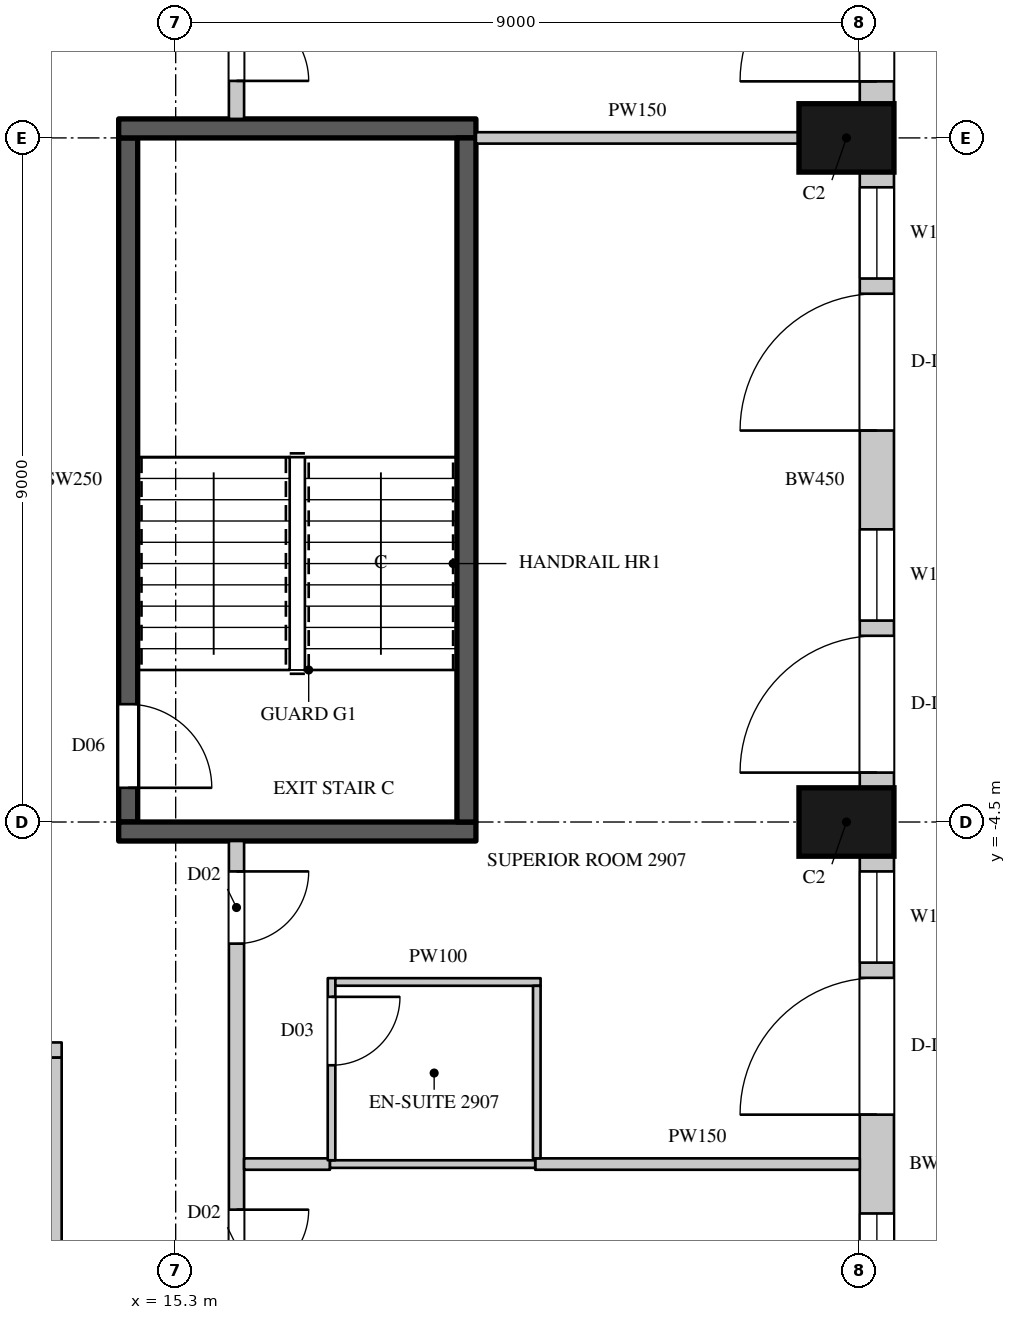
"""IFC4 building model, lengths in metres.
Left out: names, types, materials, properties, quantities, classifications, styles, units other than length and angle.
Written with IfcOpenShell. Run it as: python <this file> out.ifc"""

import sys

from ifc_helpers import new_model, si_unit, direction, frame, frame_2d, origin, origin_2d, place, context, subcontext, project, spatial, rectangle, extrude, element, fill, save


model = new_model("IFC4")
c1 = context("Model", 3, precision=1e-05, world=origin(), true_north=direction((0.0, 1.0)))
c2 = subcontext(c1, "Body", "Model", "MODEL_VIEW")
j1 = project(units=[si_unit("LENGTHUNIT", "METRE"), si_unit("PLANEANGLEUNIT", "RADIAN")], contexts=[c1])
p1 = place(None, origin())
s1 = spatial("IfcSite", under=j1, at=p1, CompositionType="ELEMENT")
p2 = place(p1, origin())
s2 = spatial("IfcBuilding", under=s1, at=p2, CompositionType="ELEMENT")
p3 = place(p2, frame((0.0, 0.0, 134.7)))
s3 = spatial("IfcBuildingStorey", under=s2, at=p3, CompositionType="ELEMENT", Elevation=134.7)
for number, where, z_axis, x_axis in (
    (1, (24.125, -4.5, 0.0), (0.0, 0.0, 1.0), (0.0, 1.0, 0.0)),
    (2, (24.125, 4.5, 0.0), (0.0, 0.0, 1.0), (0.0, 1.0, 0.0)),
):
    element("IfcColumn", number, at=place(p3, frame(where, z_axis=z_axis, x_axis=x_axis)), inside=s3, PredefinedType="COLUMN", context=c2, shape_type="SweptSolid", body=[
        extrude(rectangle(XDim=0.9, YDim=1.25, at=origin_2d()), origin(), (0.0, 0.0, 1.0), 3.6),
    ])
p4 = place(p3, frame((24.525, -13.05, 0.0), z_axis=(0.0, 0.0, 1.0), x_axis=(0.0, 1.0, 0.0)))
e3 = element("IfcWall", 3, at=p4, inside=s3, PredefinedType="SOLIDWALL", context=c2, shape_type="SweptSolid", body=[
    extrude(rectangle(XDim=8.1, YDim=0.45, at=frame_2d((4.05, 0.0))), origin(), (0.0, 0.0, 1.0), 3.3),
])
p5 = place(p4, frame((0.2, 0.0, 0.0)))
e4 = element("IfcOpeningElement", 4, at=p5, cuts=e3, PredefinedType="OPENING", context=c2, shape_type="SweptSolid", body=[
    extrude(rectangle(XDim=1.8, YDim=2.4, at=frame_2d((0.9, 1.2))), frame((0.0, 0.235, 0.0), z_axis=(0.0, -1.0, 0.0), x_axis=(1.0, 0.0, 0.0)), (0.0, 0.0, 1.0), 0.47),
])
p6 = place(p4, frame((2.2, 0.0, 1.05)))
e5 = element("IfcOpeningElement", 5, at=p6, cuts=e3, PredefinedType="OPENING", context=c2, shape_type="SweptSolid", body=[
    extrude(rectangle(XDim=1.2, YDim=2.0, at=frame_2d((0.6, 1.0))), frame((0.0, 0.235, 0.0), z_axis=(0.0, -1.0, 0.0), x_axis=(1.0, 0.0, 0.0)), (0.0, 0.0, 1.0), 0.47),
])
p7 = place(p4, frame((4.7, 0.0, 0.0)))
e6 = element("IfcOpeningElement", 6, at=p7, cuts=e3, PredefinedType="OPENING", context=c2, shape_type="SweptSolid", body=[
    extrude(rectangle(XDim=1.8, YDim=2.4, at=frame_2d((0.9, 1.2))), frame((0.0, 0.235, 0.0), z_axis=(0.0, -1.0, 0.0), x_axis=(1.0, 0.0, 0.0)), (0.0, 0.0, 1.0), 0.47),
])
p8 = place(p4, frame((6.7, 0.0, 1.05)))
e7 = element("IfcOpeningElement", 7, at=p8, cuts=e3, PredefinedType="OPENING", context=c2, shape_type="SweptSolid", body=[
    extrude(rectangle(XDim=1.2, YDim=2.0, at=frame_2d((0.6, 1.0))), frame((0.0, 0.235, 0.0), z_axis=(0.0, -1.0, 0.0), x_axis=(1.0, 0.0, 0.0)), (0.0, 0.0, 1.0), 0.47),
])
p9 = place(p3, frame((24.525, -4.05, 0.0), z_axis=(0.0, 0.0, 1.0), x_axis=(0.0, 1.0, 0.0)))
e8 = element("IfcWall", 8, at=p9, inside=s3, PredefinedType="SOLIDWALL", context=c2, shape_type="SweptSolid", body=[
    extrude(rectangle(XDim=8.1, YDim=0.45, at=frame_2d((4.05, 0.0))), origin(), (0.0, 0.0, 1.0), 3.3),
])
p10 = place(p9, frame((0.2, 0.0, 0.0)))
e9 = element("IfcOpeningElement", 9, at=p10, cuts=e8, PredefinedType="OPENING", context=c2, shape_type="SweptSolid", body=[
    extrude(rectangle(XDim=1.8, YDim=2.4, at=frame_2d((0.9, 1.2))), frame((0.0, 0.235, 0.0), z_axis=(0.0, -1.0, 0.0), x_axis=(1.0, 0.0, 0.0)), (0.0, 0.0, 1.0), 0.47),
])
p11 = place(p9, frame((2.2, 0.0, 1.05)))
e10 = element("IfcOpeningElement", 10, at=p11, cuts=e8, PredefinedType="OPENING", context=c2, shape_type="SweptSolid", body=[
    extrude(rectangle(XDim=1.2, YDim=2.0, at=frame_2d((0.6, 1.0))), frame((0.0, 0.235, 0.0), z_axis=(0.0, -1.0, 0.0), x_axis=(1.0, 0.0, 0.0)), (0.0, 0.0, 1.0), 0.47),
])
p12 = place(p9, frame((4.7, 0.0, 0.0)))
e11 = element("IfcOpeningElement", 11, at=p12, cuts=e8, PredefinedType="OPENING", context=c2, shape_type="SweptSolid", body=[
    extrude(rectangle(XDim=1.8, YDim=2.4, at=frame_2d((0.9, 1.2))), frame((0.0, 0.235, 0.0), z_axis=(0.0, -1.0, 0.0), x_axis=(1.0, 0.0, 0.0)), (0.0, 0.0, 1.0), 0.47),
])
p13 = place(p9, frame((6.7, 0.0, 1.05)))
e12 = element("IfcOpeningElement", 12, at=p13, cuts=e8, PredefinedType="OPENING", context=c2, shape_type="SweptSolid", body=[
    extrude(rectangle(XDim=1.2, YDim=2.0, at=frame_2d((0.6, 1.0))), frame((0.0, 0.235, 0.0), z_axis=(0.0, -1.0, 0.0), x_axis=(1.0, 0.0, 0.0)), (0.0, 0.0, 1.0), 0.47),
])
p14 = place(p3, frame((24.525, 4.95, 0.0), z_axis=(0.0, 0.0, 1.0), x_axis=(0.0, 1.0, 0.0)))
e13 = element("IfcWall", 13, at=p14, inside=s3, PredefinedType="SOLIDWALL", context=c2, shape_type="SweptSolid", body=[
    extrude(rectangle(XDim=8.439, YDim=0.45, at=frame_2d((4.219, 0.0))), origin(), (0.0, 0.0, 1.0), 3.3),
])
p15 = place(p14, frame((0.294, 0.0, 0.0)))
e14 = element("IfcOpeningElement", 14, at=p15, cuts=e13, PredefinedType="OPENING", context=c2, shape_type="SweptSolid", body=[
    extrude(rectangle(XDim=1.8, YDim=2.4, at=frame_2d((0.9, 1.2))), frame((0.0, 0.235, 0.0), z_axis=(0.0, -1.0, 0.0), x_axis=(1.0, 0.0, 0.0)), (0.0, 0.0, 1.0), 0.47),
])
p16 = place(p14, frame((2.294, 0.0, 1.05)))
e15 = element("IfcOpeningElement", 15, at=p16, cuts=e13, PredefinedType="OPENING", context=c2, shape_type="SweptSolid", body=[
    extrude(rectangle(XDim=1.2, YDim=2.0, at=frame_2d((0.6, 1.0))), frame((0.0, 0.235, 0.0), z_axis=(0.0, -1.0, 0.0), x_axis=(1.0, 0.0, 0.0)), (0.0, 0.0, 1.0), 0.47),
])
p17 = place(p14, frame((5.232, 0.0, 1.05)))
e16 = element("IfcOpeningElement", 16, at=p17, cuts=e13, PredefinedType="OPENING", context=c2, shape_type="SweptSolid", body=[
    extrude(rectangle(XDim=2.7, YDim=2.0, at=frame_2d((1.35, 1.0))), frame((0.0, 0.235, 0.0), z_axis=(0.0, -1.0, 0.0), x_axis=(1.0, 0.0, 0.0)), (0.0, 0.0, 1.0), 0.47),
])
p18 = place(p3, frame((10.5, -7.5, 0.0), z_axis=(0.0, 0.0, 1.0), x_axis=(1.0, 0.0, 0.0)))
e17 = element("IfcWall", 17, at=p18, inside=s3, PredefinedType="PARTITIONING", context=c2, shape_type="SweptSolid", body=[
    extrude(rectangle(XDim=3.3, YDim=0.2, at=frame_2d((1.65, 0.0))), origin(), (0.0, 0.0, 1.0), 3.3),
])
p19 = place(p18, frame((2.05, 0.0, 0.0)))
e18 = element("IfcOpeningElement", 18, at=p19, cuts=e17, PredefinedType="OPENING", context=c2, shape_type="SweptSolid", body=[
    extrude(rectangle(XDim=0.9, YDim=2.2, at=frame_2d((0.45, 1.1))), frame((0.0, 0.11, 0.0), z_axis=(0.0, -1.0, 0.0), x_axis=(1.0, 0.0, 0.0)), (0.0, 0.0, 1.0), 0.22),
])
p20 = place(p3, frame((13.7, -15.0, 0.0), z_axis=(0.0, 0.0, 1.0), x_axis=(0.0, 1.0, 0.0)))
e19 = element("IfcWall", 19, at=p20, inside=s3, PredefinedType="PARTITIONING", context=c2, shape_type="SweptSolid", body=[
    extrude(rectangle(XDim=7.4, YDim=0.2, at=frame_2d((3.7, 0.0))), origin(), (0.0, 0.0, 1.0), 3.3),
])
p21 = place(p3, frame((16.1, -17.5, 0.0), z_axis=(0.0, 0.0, 1.0), x_axis=(0.0, 1.0, 0.0)))
e20 = element("IfcWall", 20, at=p21, inside=s3, PredefinedType="PARTITIONING", context=c2, shape_type="SweptSolid", body=[
    extrude(rectangle(XDim=12.75, YDim=0.2, at=frame_2d((6.375, 0.0))), origin(), (0.0, 0.0, 1.0), 3.3),
])
p22 = place(p21, frame((2.75, 0.0, 0.0)))
e21 = element("IfcOpeningElement", 21, at=p22, cuts=e20, PredefinedType="OPENING", context=c2, shape_type="SweptSolid", body=[
    extrude(rectangle(XDim=0.95, YDim=2.2, at=frame_2d((0.475, 1.1))), frame((0.0, 0.11, 0.0), z_axis=(0.0, -1.0, 0.0), x_axis=(1.0, 0.0, 0.0)), (0.0, 0.0, 1.0), 0.22),
])
p23 = place(p21, frame((6.95, 0.0, 0.0)))
e22 = element("IfcOpeningElement", 22, at=p23, cuts=e20, PredefinedType="OPENING", context=c2, shape_type="SweptSolid", body=[
    extrude(rectangle(XDim=0.95, YDim=2.2, at=frame_2d((0.475, 1.1))), frame((0.0, 0.11, 0.0), z_axis=(0.0, -1.0, 0.0), x_axis=(1.0, 0.0, 0.0)), (0.0, 0.0, 1.0), 0.22),
])
p24 = place(p21, frame((11.4, 0.0, 0.0)))
e23 = element("IfcOpeningElement", 23, at=p24, cuts=e20, PredefinedType="OPENING", context=c2, shape_type="SweptSolid", body=[
    extrude(rectangle(XDim=0.95, YDim=2.2, at=frame_2d((0.475, 1.1))), frame((0.0, 0.11, 0.0), z_axis=(0.0, -1.0, 0.0), x_axis=(1.0, 0.0, 0.0)), (0.0, 0.0, 1.0), 0.22),
])
p25 = place(p3, frame((16.1, 4.75, 0.0), z_axis=(0.0, 0.0, 1.0), x_axis=(0.0, 1.0, 0.0)))
e24 = element("IfcWall", 24, at=p25, inside=s3, PredefinedType="PARTITIONING", context=c2, shape_type="SweptSolid", body=[
    extrude(rectangle(XDim=12.65, YDim=0.2, at=frame_2d((6.325, 0.0))), origin(), (0.0, 0.0, 1.0), 3.3),
])
p26 = place(p25, frame((0.5, 0.0, 0.0)))
e25 = element("IfcOpeningElement", 25, at=p26, cuts=e24, PredefinedType="OPENING", context=c2, shape_type="SweptSolid", body=[
    extrude(rectangle(XDim=0.95, YDim=2.2, at=frame_2d((0.475, 1.1))), frame((0.0, 0.11, 0.0), z_axis=(0.0, -1.0, 0.0), x_axis=(1.0, 0.0, 0.0)), (0.0, 0.0, 1.0), 0.22),
])
p27 = place(p25, frame((6.9, 0.0, 0.0)))
e26 = element("IfcOpeningElement", 26, at=p27, cuts=e24, PredefinedType="OPENING", context=c2, shape_type="SweptSolid", body=[
    extrude(rectangle(XDim=0.95, YDim=2.2, at=frame_2d((0.475, 1.1))), frame((0.0, 0.11, 0.0), z_axis=(0.0, -1.0, 0.0), x_axis=(1.0, 0.0, 0.0)), (0.0, 0.0, 1.0), 0.22),
])
p28 = place(p3, frame((16.2, -9.0, 0.0), z_axis=(0.0, 0.0, 1.0), x_axis=(1.0, 0.0, 0.0)))
e27 = element("IfcWall", 27, at=p28, inside=s3, PredefinedType="PARTITIONING", context=c2, shape_type="SweptSolid", body=[
    extrude(rectangle(XDim=1.13, YDim=0.15, at=frame_2d((0.565, 0.0))), origin(), (0.0, 0.0, 1.0), 2.65),
])
p29 = place(p3, frame((19.25, 4.5, 0.0), z_axis=(0.0, 0.0, 1.0), x_axis=(1.0, 0.0, 0.0)))
e28 = element("IfcWall", 28, at=p29, inside=s3, PredefinedType="PARTITIONING", context=c2, shape_type="SweptSolid", body=[
    extrude(rectangle(XDim=4.25, YDim=0.15, at=frame_2d((2.125, 0.0))), origin(), (0.0, 0.0, 1.0), 3.3),
])
p30 = place(p3, frame((20.03, -9.0, 0.0), z_axis=(0.0, 0.0, 1.0), x_axis=(1.0, 0.0, 0.0)))
e29 = element("IfcWall", 29, at=p30, inside=s3, PredefinedType="PARTITIONING", context=c2, shape_type="SweptSolid", body=[
    extrude(rectangle(XDim=4.27, YDim=0.15, at=frame_2d((2.135, 0.0))), origin(), (0.0, 0.0, 1.0), 2.65),
])
p31 = place(p3, frame((14.675, -4.5, 0.0), z_axis=(0.0, 0.0, 1.0), x_axis=(0.0, 1.0, 0.0)))
e30 = element("IfcWall", 30, at=p31, inside=s3, PredefinedType="SHEAR", context=c2, shape_type="SweptSolid", body=[
    extrude(rectangle(XDim=9.0, YDim=0.25, at=frame_2d((4.5, 0.0))), origin(), (0.0, 0.0, 1.0), 3.3),
])
p32 = place(p31, frame((0.45, 0.0, 0.0)))
e31 = element("IfcOpeningElement", 31, at=p32, cuts=e30, PredefinedType="OPENING", context=c2, shape_type="SweptSolid", body=[
    extrude(rectangle(XDim=1.1, YDim=2.2, at=frame_2d((0.55, 1.1))), frame((0.0, 0.135, 0.0), z_axis=(0.0, -1.0, 0.0), x_axis=(1.0, 0.0, 0.0)), (0.0, 0.0, 1.0), 0.27),
])
for number, where, z_axis, x_axis in (
    (32, (14.55, -4.625, 0.0), (0.0, 0.0, 1.0), (1.0, 0.0, 0.0)),
    (33, (14.55, 4.625, 0.0), (0.0, 0.0, 1.0), (1.0, 0.0, 0.0)),
):
    element("IfcWall", number, at=place(p3, frame(where, z_axis=z_axis, x_axis=x_axis)), inside=s3, PredefinedType="SHEAR", context=c2, shape_type="SweptSolid", body=[
        extrude(rectangle(XDim=4.7, YDim=0.25, at=frame_2d((2.35, 0.0))), origin(), (0.0, 0.0, 1.0), 3.3),
    ])
p33 = place(p3, frame((19.125, -4.5, 0.0), z_axis=(0.0, 0.0, 1.0), x_axis=(0.0, 1.0, 0.0)))
e34 = element("IfcWall", 34, at=p33, inside=s3, PredefinedType="SHEAR", context=c2, shape_type="SweptSolid", body=[
    extrude(rectangle(XDim=9.0, YDim=0.25, at=frame_2d((4.5, 0.0))), origin(), (0.0, 0.0, 1.0), 3.3),
])
p34 = place(p3, frame((17.33, -9.0, 0.0), z_axis=(0.0, 0.0, 1.0), x_axis=(1.0, 0.0, 0.0)))
e35 = element("IfcWall", 35, at=p34, inside=s3, PredefinedType="PARTITIONING", context=c2, shape_type="SweptSolid", body=[
    extrude(rectangle(XDim=2.7, YDim=0.1, at=frame_2d((1.35, 0.0))), origin(), (0.0, 0.0, 1.0), 2.65),
])
p35 = place(p3, frame((17.35, -8.95, 0.0), z_axis=(0.0, 0.0, 1.0), x_axis=(0.000407580973, 0.999999916939, 0.0)))
e36 = element("IfcWall", 36, at=p35, inside=s3, PredefinedType="PARTITIONING", context=c2, shape_type="SweptSolid", body=[
    extrude(rectangle(XDim=2.396, YDim=0.1, at=frame_2d((1.198, 0.0))), origin(), (0.0, 0.0, 1.0), 3.3),
])
p36 = place(p35, frame((1.25, 0.0, 0.0)))
e37 = element("IfcOpeningElement", 37, at=p36, cuts=e36, PredefinedType="OPENING", context=c2, shape_type="SweptSolid", body=[
    extrude(rectangle(XDim=0.9, YDim=2.2, at=frame_2d((0.45, 1.1))), frame((0.0, 0.06, 0.0), z_axis=(0.0, -1.0, 0.0), x_axis=(1.0, 0.0, 0.0)), (0.0, 0.0, 1.0), 0.12),
])
p37 = place(p3, frame((17.401, -6.604, 0.0), z_axis=(0.0, 0.0, 1.0), x_axis=(0.9999999346, -0.000361663629, 0.0)))
e38 = element("IfcWall", 38, at=p37, inside=s3, PredefinedType="PARTITIONING", context=c2, shape_type="SweptSolid", body=[
    extrude(rectangle(XDim=2.7, YDim=0.1, at=frame_2d((1.35, 0.0))), origin(), (0.0, 0.0, 1.0), 3.3),
])
p38 = place(p3, frame((20.05, -8.925, 0.0), z_axis=(0.0, 0.0, 1.0), x_axis=(0.000430200003, 0.999999907464, 0.0)))
e39 = element("IfcWall", 39, at=p38, inside=s3, PredefinedType="PARTITIONING", context=c2, shape_type="SweptSolid", body=[
    extrude(rectangle(XDim=2.27, YDim=0.1, at=frame_2d((1.135, 0.0))), origin(), (0.0, 0.0, 1.0), 3.3),
])
p39 = place(p6, origin())
e40 = element("IfcWindow", 40, at=p39, inside=s3, PartitioningType="SINGLE_PANEL", PredefinedType="WINDOW", context=c2, shape_type="SweptSolid", body=[
    extrude(rectangle(XDim=1.2, YDim=2.0, at=frame_2d((0.6, 1.0))), frame((0.0, 0.135, 0.0), z_axis=(0.0, -1.0, 0.0), x_axis=(1.0, 0.0, 0.0)), (0.0, 0.0, 1.0), 0.06),
])
fill(e5, e40)
p40 = place(p7, origin())
e41 = element("IfcDoor", 41, at=p40, inside=s3, OperationType="SLIDING_TO_LEFT", PredefinedType="DOOR", context=c2, shape_type="SweptSolid", body=[
    extrude(rectangle(XDim=1.8, YDim=2.4, at=frame_2d((0.9, 1.2))), frame((0.0, 0.13, 0.0), z_axis=(0.0, -1.0, 0.0), x_axis=(1.0, 0.0, 0.0)), (0.0, 0.0, 1.0), 0.05),
])
fill(e6, e41)
p41 = place(p8, origin())
e42 = element("IfcWindow", 42, at=p41, inside=s3, PartitioningType="SINGLE_PANEL", PredefinedType="WINDOW", context=c2, shape_type="SweptSolid", body=[
    extrude(rectangle(XDim=1.2, YDim=2.0, at=frame_2d((0.6, 1.0))), frame((0.0, 0.135, 0.0), z_axis=(0.0, -1.0, 0.0), x_axis=(1.0, 0.0, 0.0)), (0.0, 0.0, 1.0), 0.06),
])
fill(e7, e42)
p42 = place(p10, origin())
e43 = element("IfcDoor", 43, at=p42, inside=s3, OperationType="SLIDING_TO_LEFT", PredefinedType="DOOR", context=c2, shape_type="SweptSolid", body=[
    extrude(rectangle(XDim=1.8, YDim=2.4, at=frame_2d((0.9, 1.2))), frame((0.0, 0.13, 0.0), z_axis=(0.0, -1.0, 0.0), x_axis=(1.0, 0.0, 0.0)), (0.0, 0.0, 1.0), 0.05),
])
fill(e9, e43)
p43 = place(p11, origin())
e44 = element("IfcWindow", 44, at=p43, inside=s3, PartitioningType="SINGLE_PANEL", PredefinedType="WINDOW", context=c2, shape_type="SweptSolid", body=[
    extrude(rectangle(XDim=1.2, YDim=2.0, at=frame_2d((0.6, 1.0))), frame((0.0, 0.135, 0.0), z_axis=(0.0, -1.0, 0.0), x_axis=(1.0, 0.0, 0.0)), (0.0, 0.0, 1.0), 0.06),
])
fill(e10, e44)
p44 = place(p12, origin())
e45 = element("IfcDoor", 45, at=p44, inside=s3, OperationType="SLIDING_TO_LEFT", PredefinedType="DOOR", context=c2, shape_type="SweptSolid", body=[
    extrude(rectangle(XDim=1.8, YDim=2.4, at=frame_2d((0.9, 1.2))), frame((0.0, 0.13, 0.0), z_axis=(0.0, -1.0, 0.0), x_axis=(1.0, 0.0, 0.0)), (0.0, 0.0, 1.0), 0.05),
])
fill(e11, e45)
p45 = place(p13, origin())
e46 = element("IfcWindow", 46, at=p45, inside=s3, PartitioningType="SINGLE_PANEL", PredefinedType="WINDOW", context=c2, shape_type="SweptSolid", body=[
    extrude(rectangle(XDim=1.2, YDim=2.0, at=frame_2d((0.6, 1.0))), frame((0.0, 0.135, 0.0), z_axis=(0.0, -1.0, 0.0), x_axis=(1.0, 0.0, 0.0)), (0.0, 0.0, 1.0), 0.06),
])
fill(e12, e46)
p46 = place(p15, origin())
e47 = element("IfcDoor", 47, at=p46, inside=s3, OperationType="SLIDING_TO_LEFT", PredefinedType="DOOR", context=c2, shape_type="SweptSolid", body=[
    extrude(rectangle(XDim=1.8, YDim=2.4, at=frame_2d((0.9, 1.2))), frame((0.0, 0.13, 0.0), z_axis=(0.0, -1.0, 0.0), x_axis=(1.0, 0.0, 0.0)), (0.0, 0.0, 1.0), 0.05),
])
fill(e14, e47)
p47 = place(p23, origin())
e48 = element("IfcDoor", 48, at=p47, inside=s3, OperationType="SINGLE_SWING_LEFT", PredefinedType="DOOR", context=c2, shape_type="SweptSolid", body=[
    extrude(rectangle(XDim=0.95, YDim=2.2, at=frame_2d((0.475, 1.1))), frame((0.0, 0.025, 0.0), z_axis=(0.0, -1.0, 0.0), x_axis=(1.0, 0.0, 0.0)), (0.0, 0.0, 1.0), 0.05),
])
fill(e22, e48)
p48 = place(p24, origin())
e49 = element("IfcDoor", 49, at=p48, inside=s3, OperationType="SINGLE_SWING_LEFT", PredefinedType="DOOR", context=c2, shape_type="SweptSolid", body=[
    extrude(rectangle(XDim=0.95, YDim=2.2, at=frame_2d((0.475, 1.1))), frame((0.0, 0.025, 0.0), z_axis=(0.0, -1.0, 0.0), x_axis=(1.0, 0.0, 0.0)), (0.0, 0.0, 1.0), 0.05),
])
fill(e23, e49)
p49 = place(p36, origin())
e50 = element("IfcDoor", 50, at=p49, inside=s3, OperationType="SINGLE_SWING_LEFT", PredefinedType="DOOR", context=c2, shape_type="SweptSolid", body=[
    extrude(rectangle(XDim=0.9, YDim=2.2, at=frame_2d((0.45, 1.1))), frame((0.0, 0.025, 0.0), z_axis=(0.0, -1.0, 0.0), x_axis=(1.0, 0.0, 0.0)), (0.0, 0.0, 1.0), 0.05),
])
fill(e37, e50)
p50 = place(p26, origin())
e51 = element("IfcDoor", 51, at=p50, inside=s3, OperationType="SINGLE_SWING_RIGHT", PredefinedType="DOOR", context=c2, shape_type="SweptSolid", body=[
    extrude(rectangle(XDim=0.95, YDim=2.2, at=frame_2d((0.475, 1.1))), frame((0.0, 0.025, 0.0), z_axis=(0.0, -1.0, 0.0), x_axis=(1.0, 0.0, 0.0)), (0.0, 0.0, 1.0), 0.05),
])
fill(e25, e51)
p51 = place(p32, origin())
e52 = element("IfcDoor", 52, at=p51, inside=s3, OperationType="SINGLE_SWING_RIGHT", PredefinedType="DOOR", context=c2, shape_type="SweptSolid", body=[
    extrude(rectangle(XDim=1.1, YDim=2.2, at=frame_2d((0.55, 1.1))), frame((0.0, 0.025, 0.0), z_axis=(0.0, -1.0, 0.0), x_axis=(1.0, 0.0, 0.0)), (0.0, 0.0, 1.0), 0.05),
])
fill(e31, e52)
save(model, sys.argv[1])
